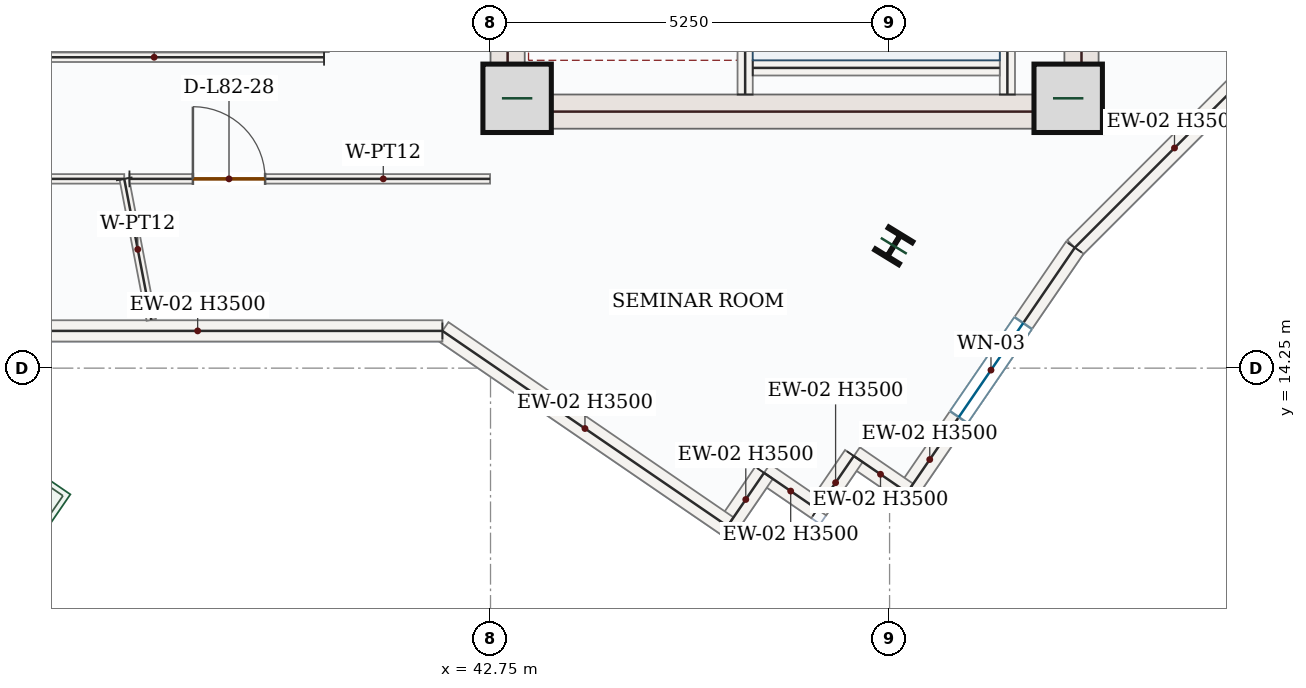
"""IFC4 building model, lengths in metres.
Left out: names, types, materials, properties, quantities, classifications, styles, units other than length and angle.
Written with IfcOpenShell. Run it as: python <this file> out.ifc"""

import sys

from ifc_helpers import new_model, si_unit, direction, frame, frame_2d, origin, origin_2d, place, context, subcontext, project, spatial, rectangle, i_section, extrude, source, transform, mapped, element, fill, save


model = new_model("IFC4")
c1 = context("Model", 3, precision=1e-05, world=origin(), true_north=direction((0.0, 1.0)))
c2 = subcontext(c1, "Body", "Model", "MODEL_VIEW")
j1 = project(units=[si_unit("LENGTHUNIT", "METRE"), si_unit("PLANEANGLEUNIT", "RADIAN")], contexts=[c1])
p1 = place(None, origin())
s1 = spatial("IfcSite", under=j1, at=p1, CompositionType="ELEMENT")
p2 = place(p1, origin())
s2 = spatial("IfcBuilding", under=s1, at=p2, CompositionType="ELEMENT")
p3 = place(p2, frame((0.0, 0.0, 338.55)))
s3 = spatial("IfcBuildingStorey", under=s2, at=p3, CompositionType="ELEMENT", Elevation=338.55)
p4 = place(p3, frame((42.975, 17.4, 0.0), z_axis=(0.0, 0.0, 1.0), x_axis=(0.0, 1.0, 0.0)))
e1 = element("IfcWall", 1, at=p4, inside=s3, PredefinedType="SHEAR", context=c2, shape_type="SweptSolid", body=[
    extrude(rectangle(XDim=8.55, YDim=0.45, at=frame_2d((4.275, 0.0))), origin(), (0.0, 0.0, 1.0), 3.5),
])
p5 = place(p4, frame((6.65, 0.0, 0.0)))
e2 = element("IfcOpeningElement", 2, at=p5, cuts=e1, PredefinedType="OPENING", context=c2, shape_type="SweptSolid", body=[
    extrude(rectangle(XDim=1.1, YDim=2.2, at=frame_2d((0.55, 1.1))), frame((0.0, 0.235, 0.0), z_axis=(0.0, -1.0, 0.0), x_axis=(1.0, 0.0, 0.0)), (0.0, 0.0, 1.0), 0.47),
])
p6 = place(p4, frame((1.75, 0.0, 0.0)))
e3 = element("IfcOpeningElement", 3, at=p6, cuts=e1, PredefinedType="OPENING", context=c2, shape_type="SweptSolid", body=[
    extrude(rectangle(XDim=1.3, YDim=2.2, at=frame_2d((0.65, 1.1))), frame((0.0, 0.235, 0.0), z_axis=(0.0, -1.0, 0.0), x_axis=(1.0, 0.0, 0.0)), (0.0, 0.0, 1.0), 0.47),
])
p7 = place(p4, frame((4.55, 0.0, 0.0)))
e4 = element("IfcOpeningElement", 4, at=p7, cuts=e1, PredefinedType="OPENING", context=c2, shape_type="SweptSolid", body=[
    extrude(rectangle(XDim=0.88, YDim=2.1, at=frame_2d((0.44, 1.05))), frame((0.0, 0.235, 0.0), z_axis=(0.0, -1.0, 0.0), x_axis=(1.0, 0.0, 0.0)), (0.0, 0.0, 1.0), 0.47),
])
m1 = source(origin(), c2, "Body", "SweptSolid", [
    extrude(rectangle(XDim=8.55, YDim=0.45, at=frame_2d((4.275, 0.0))), origin(), (0.0, 0.0, 1.0), 3.5),
])
p8 = place(p3, frame((50.525, 17.4, 0.0), z_axis=(0.0, 0.0, 1.0), x_axis=(0.0, 1.0, 0.0)))
e5 = element("IfcWall", 5, at=p8, inside=s3, PredefinedType="SHEAR", context=c2, shape_type="MappedRepresentation", body=[
    mapped(m1, transform((0.0, 0.0, 0.0), x_axis=(1.0, 0.0, 0.0), y_axis=(0.0, 1.0, 0.0), z_axis=(0.0, 0.0, 1.0), scale=1.0)),
])
m2 = source(origin(), c2, "Body", "SweptSolid", [
    extrude(rectangle(XDim=7.1, YDim=0.45, at=frame_2d((3.55, 0.0))), origin(), (0.0, 0.0, 1.0), 3.5),
])
p9 = place(p3, frame((43.2, 17.625, 0.0), z_axis=(0.0, 0.0, 1.0), x_axis=(1.0, 0.0, 0.0)))
e6 = element("IfcWall", 6, at=p9, inside=s3, PredefinedType="SHEAR", context=c2, shape_type="MappedRepresentation", body=[
    mapped(m2, transform((0.0, 0.0, 0.0), x_axis=(1.0, 0.0, 0.0), y_axis=(0.0, 1.0, 0.0), z_axis=(0.0, 0.0, 1.0), scale=1.0)),
])
m3 = source(origin(), c2, "Body", "SweptSolid", [
    extrude(rectangle(XDim=0.9, YDim=0.9, at=origin_2d()), origin(), (0.0, 0.0, 1.0), 3.75),
])
for number, where, z_axis, x_axis in (
    (7, (43.1, 17.8, 0.0), (0.0, 0.0, 1.0), (1.0, 0.0, 0.0)),
    (8, (50.35, 17.8, 0.0), (0.0, 0.0, 1.0), (1.0, 0.0, 0.0)),
):
    element("IfcColumn", number, at=place(p3, frame(where, z_axis=z_axis, x_axis=x_axis)), inside=s3, PredefinedType="COLUMN", context=c2, shape_type="MappedRepresentation", body=[
        mapped(m3, transform((0.0, 0.0, 0.0), x_axis=(1.0, 0.0, 0.0), y_axis=(0.0, 1.0, 0.0), z_axis=(0.0, 0.0, 1.0), scale=1.0)),
    ])
m4 = source(origin(), c2, "Body", "SweptSolid", [
    extrude(i_section(OverallWidth=0.369, OverallDepth=0.356, WebThickness=0.011, FlangeThickness=0.018, FilletRadius=0.018, at=origin_2d()), origin(), (0.0, 0.0, 1.0), 3.75),
])
p10 = place(p3, frame((48.055, 15.859, 0.0), z_axis=(0.0, 0.0, 1.0), x_axis=(-0.852640164354, 0.522498564716, 0.0)))
e9 = element("IfcColumn", 9, at=p10, inside=s3, PredefinedType="COLUMN", context=c2, shape_type="MappedRepresentation", body=[
    mapped(m4, transform((0.0, 0.0, 0.0), x_axis=(1.0, 0.0, 0.0), y_axis=(0.0, 1.0, 0.0), z_axis=(0.0, 0.0, 1.0), scale=1.0)),
])
m5 = source(origin(), c2, "Body", "SweptSolid", [
    extrude(rectangle(XDim=3.709, YDim=0.28, at=frame_2d((1.855, 0.0))), origin(), (0.0, 0.0, 1.0), 3.5),
])
p11 = place(p3, frame((53.06, 18.458, 0.0), z_axis=(0.0, 0.0, 1.0), x_axis=(-0.707106781187, -0.707106781187, 0.0)))
e10 = element("IfcWall", 10, at=p11, inside=s3, PredefinedType="SOLIDWALL", context=c2, shape_type="MappedRepresentation", body=[
    mapped(m5, transform((0.0, 0.0, 0.0), x_axis=(1.0, 0.0, 0.0), y_axis=(0.0, 1.0, 0.0), z_axis=(0.0, 0.0, 1.0), scale=1.0)),
])
p12 = place(p3, frame((50.437, 15.835, 0.0), z_axis=(0.0, 0.0, 1.0), x_axis=(-0.564961879511, -0.825117006672, 0.0)))
e11 = element("IfcWall", 11, at=p12, inside=s3, PredefinedType="SOLIDWALL", context=c2, shape_type="SweptSolid", body=[
    extrude(rectangle(XDim=3.904, YDim=0.28, at=frame_2d((1.952, 0.0))), origin(), (0.0, 0.0, 1.0), 3.5),
])
p13 = place(p12, frame((1.202, 0.0, 0.85)))
e12 = element("IfcOpeningElement", 12, at=p13, cuts=e11, PredefinedType="OPENING", context=c2, shape_type="SweptSolid", body=[
    extrude(rectangle(XDim=1.5, YDim=1.5, at=frame_2d((0.75, 0.75))), frame((0.0, 0.15, 0.0), z_axis=(0.0, -1.0, 0.0), x_axis=(1.0, 0.0, 0.0)), (0.0, 0.0, 1.0), 0.3),
])
m6 = source(origin(), c2, "Body", "SweptSolid", [
    extrude(rectangle(XDim=0.85, YDim=0.28, at=frame_2d((0.425, 0.0))), origin(), (0.0, 0.0, 1.0), 3.5),
])
for number, where, z_axis, x_axis in (
    (13, (48.231, 12.614, 0.0), (0.0, 0.0, 1.0), (-0.825, 0.565, 0.0)),
    (14, (47.53, 13.094, 0.0), (0.0, 0.0, 1.0), (-0.565, -0.825, 0.0)),
    (15, (47.05, 12.393, 0.0), (0.0, 0.0, 1.0), (-0.825, 0.565, 0.0)),
    (16, (46.348, 12.873, 0.0), (0.0, 0.0, 1.0), (-0.565, -0.825, 0.0)),
):
    element("IfcWall", number, at=place(p3, frame(where, z_axis=z_axis, x_axis=x_axis)), inside=s3, PredefinedType="SOLIDWALL", context=c2, shape_type="MappedRepresentation", body=[
        mapped(m6, transform((0.0, 0.0, 0.0), x_axis=(1.0, 0.0, 0.0), y_axis=(0.0, 1.0, 0.0), z_axis=(0.0, 0.0, 1.0), scale=1.0)),
    ])
m7 = source(origin(), c2, "Body", "SweptSolid", [
    extrude(rectangle(XDim=4.546, YDim=0.28, at=frame_2d((2.273, 0.0))), origin(), (0.0, 0.0, 1.0), 3.5),
])
p14 = place(p3, frame((45.868, 12.171, 0.0), z_axis=(0.0, 0.0, 1.0), x_axis=(-0.825104362901, 0.564980345075, 0.0)))
e17 = element("IfcWall", 17, at=p14, inside=s3, PredefinedType="SOLIDWALL", context=c2, shape_type="MappedRepresentation", body=[
    mapped(m7, transform((0.0, 0.0, 0.0), x_axis=(1.0, 0.0, 0.0), y_axis=(0.0, 1.0, 0.0), z_axis=(0.0, 0.0, 1.0), scale=1.0)),
])
m8 = source(origin(), c2, "Body", "SweptSolid", [
    extrude(rectangle(XDim=6.44, YDim=0.28, at=frame_2d((3.22, 0.0))), origin(), (0.0, 0.0, 1.0), 3.5),
])
p15 = place(p3, frame((42.117, 14.74, 0.0), z_axis=(0.0, 0.0, 1.0), x_axis=(-1.0, 0.0, 0.0)))
e18 = element("IfcWall", 18, at=p15, inside=s3, PredefinedType="SOLIDWALL", context=c2, shape_type="MappedRepresentation", body=[
    mapped(m8, transform((0.0, 0.0, 0.0), x_axis=(1.0, 0.0, 0.0), y_axis=(0.0, 1.0, 0.0), z_axis=(0.0, 0.0, 1.0), scale=1.0)),
])
m9 = source(origin(), c2, "Body", "SweptSolid", [
    extrude(rectangle(XDim=7.87, YDim=0.2, at=frame_2d((3.935, 0.0))), origin(), (0.0, 0.0, 1.0), 3.5),
])
p16 = place(p3, frame((49.55, 17.85, 0.0), z_axis=(0.0, 0.0, 1.0), x_axis=(0.0, 1.0, 0.0)))
e19 = element("IfcWall", 19, at=p16, inside=s3, PredefinedType="SOLIDWALL", context=c2, shape_type="MappedRepresentation", body=[
    mapped(m9, transform((0.0, 0.0, 0.0), x_axis=(1.0, 0.0, 0.0), y_axis=(0.0, 1.0, 0.0), z_axis=(0.0, 0.0, 1.0), scale=1.0)),
])
p17 = place(p3, frame((46.1, 17.85, 0.0), z_axis=(0.0, 0.0, 1.0), x_axis=(0.0, 1.0, 0.0)))
e20 = element("IfcWall", 20, at=p17, inside=s3, PredefinedType="SOLIDWALL", context=c2, shape_type="SweptSolid", body=[
    extrude(rectangle(XDim=8.0, YDim=0.2, at=frame_2d((4.0, 0.0))), origin(), (0.0, 0.0, 1.0), 3.5),
])
p18 = place(p17, frame((6.3, 0.0, 0.0)))
e21 = element("IfcOpeningElement", 21, at=p18, cuts=e20, PredefinedType="OPENING", context=c2, shape_type="SweptSolid", body=[
    extrude(rectangle(XDim=1.05, YDim=2.15, at=frame_2d((0.525, 1.075))), frame((0.0, 0.11, 0.0), z_axis=(0.0, -1.0, 0.0), x_axis=(1.0, 0.0, 0.0)), (0.0, 0.0, 1.0), 0.22),
])
m10 = source(origin(), c2, "Body", "SweptSolid", [
    extrude(rectangle(XDim=3.25, YDim=0.2, at=frame_2d((1.625, 0.0))), origin(), (0.0, 0.0, 1.0), 3.5),
])
p19 = place(p3, frame((46.2, 18.2, 0.0), z_axis=(0.0, 0.0, 1.0), x_axis=(1.0, 0.0, 0.0)))
e22 = element("IfcWall", 22, at=p19, inside=s3, PredefinedType="SOLIDWALL", context=c2, shape_type="MappedRepresentation", body=[
    mapped(m10, transform((0.0, 0.0, 0.0), x_axis=(1.0, 0.0, 0.0), y_axis=(0.0, 1.0, 0.0), z_axis=(0.0, 0.0, 1.0), scale=1.0)),
])
m11 = source(origin(), c2, "Body", "SweptSolid", [
    extrude(rectangle(XDim=4.47, YDim=0.125, at=frame_2d((2.235, 0.0))), origin(), (0.0, 0.0, 1.0), 3.5),
])
p20 = place(p3, frame((40.56, 18.34, 0.0), z_axis=(0.0, 0.0, 1.0), x_axis=(-1.0, 0.0, 0.0)))
e23 = element("IfcWall", 23, at=p20, inside=s3, PredefinedType="PARTITIONING", context=c2, shape_type="MappedRepresentation", body=[
    mapped(m11, transform((0.0, 0.0, 0.0), x_axis=(1.0, 0.0, 0.0), y_axis=(0.0, 1.0, 0.0), z_axis=(0.0, 0.0, 1.0), scale=1.0)),
])
p21 = place(p3, frame((32.235, 16.74, 0.0), z_axis=(0.0, 0.0, 1.0), x_axis=(1.0, 0.0, 0.0)))
e24 = element("IfcWall", 24, at=p21, inside=s3, PredefinedType="PARTITIONING", context=c2, shape_type="SweptSolid", body=[
    extrude(rectangle(XDim=5.696, YDim=0.125, at=frame_2d((2.848, 0.0))), origin(), (0.0, 0.0, 1.0), 3.5),
])
p22 = place(p21, frame((3.085, 0.0, 0.0)))
e25 = element("IfcOpeningElement", 25, at=p22, cuts=e24, PredefinedType="OPENING", context=c2, shape_type="SweptSolid", body=[
    extrude(rectangle(XDim=0.95, YDim=2.15, at=frame_2d((0.475, 1.075))), frame((0.0, 0.073, 0.0), z_axis=(0.0, -1.0, 0.0), x_axis=(1.0, 0.0, 0.0)), (0.0, 0.0, 1.0), 0.145),
])
m12 = source(origin(), c2, "Body", "SweptSolid", [
    extrude(rectangle(XDim=1.889, YDim=0.125, at=frame_2d((0.944, 0.0))), origin(), (0.0, 0.0, 1.0), 3.5),
])
p23 = place(p3, frame((37.931, 16.74, 0.0), z_axis=(0.0, 0.0, 1.0), x_axis=(0.188454265316, -0.982081966989, 0.0)))
e26 = element("IfcWall", 26, at=p23, inside=s3, PredefinedType="PARTITIONING", context=c2, shape_type="MappedRepresentation", body=[
    mapped(m12, transform((0.0, 0.0, 0.0), x_axis=(1.0, 0.0, 0.0), y_axis=(0.0, 1.0, 0.0), z_axis=(0.0, 0.0, 1.0), scale=1.0)),
])
p24 = place(p3, frame((38.0, 16.74, 0.0), z_axis=(0.0, 0.0, 1.0), x_axis=(1.0, 0.0, 0.0)))
e27 = element("IfcWall", 27, at=p24, inside=s3, PredefinedType="PARTITIONING", context=c2, shape_type="SweptSolid", body=[
    extrude(rectangle(XDim=4.744, YDim=0.125, at=frame_2d((2.372, 0.0))), origin(), (0.0, 0.0, 1.0), 3.5),
])
p25 = place(p24, frame((0.835, 0.0, 0.0)))
e28 = element("IfcOpeningElement", 28, at=p25, cuts=e27, PredefinedType="OPENING", context=c2, shape_type="SweptSolid", body=[
    extrude(rectangle(XDim=0.95, YDim=2.15, at=frame_2d((0.475, 1.075))), frame((0.0, 0.073, 0.0), z_axis=(0.0, -1.0, 0.0), x_axis=(1.0, 0.0, 0.0)), (0.0, 0.0, 1.0), 0.145),
])
m13 = source(origin(), c2, "Body", "SweptSolid", [
    extrude(rectangle(XDim=1.5, YDim=1.5, at=frame_2d((0.75, 0.75))), frame((0.0, 0.03, 0.0), z_axis=(0.0, -1.0, 0.0), x_axis=(1.0, 0.0, 0.0)), (0.0, 0.0, 1.0), 0.06),
])
p26 = place(p13, origin())
e29 = element("IfcWindow", 29, at=p26, inside=s3, PartitioningType="SINGLE_PANEL", PredefinedType="WINDOW", context=c2, shape_type="MappedRepresentation", body=[
    mapped(m13, transform((0.0, 0.0, 0.0), x_axis=(1.0, 0.0, 0.0), y_axis=(0.0, 1.0, 0.0), z_axis=(0.0, 0.0, 1.0), scale=1.0)),
])
fill(e12, e29)
m14 = source(origin(), c2, "Body", "SweptSolid", [
    extrude(rectangle(XDim=0.95, YDim=2.15, at=frame_2d((0.475, 1.075))), frame((0.0, 0.025, 0.0), z_axis=(0.0, -1.0, 0.0), x_axis=(1.0, 0.0, 0.0)), (0.0, 0.0, 1.0), 0.05),
])
p27 = place(p25, origin())
e30 = element("IfcDoor", 30, at=p27, inside=s3, OperationType="SINGLE_SWING_LEFT", PredefinedType="DOOR", context=c2, shape_type="MappedRepresentation", body=[
    mapped(m14, transform((0.0, 0.0, 0.0), x_axis=(1.0, 0.0, 0.0), y_axis=(0.0, 1.0, 0.0), z_axis=(0.0, 0.0, 1.0), scale=1.0)),
])
fill(e28, e30)
save(model, sys.argv[1])
